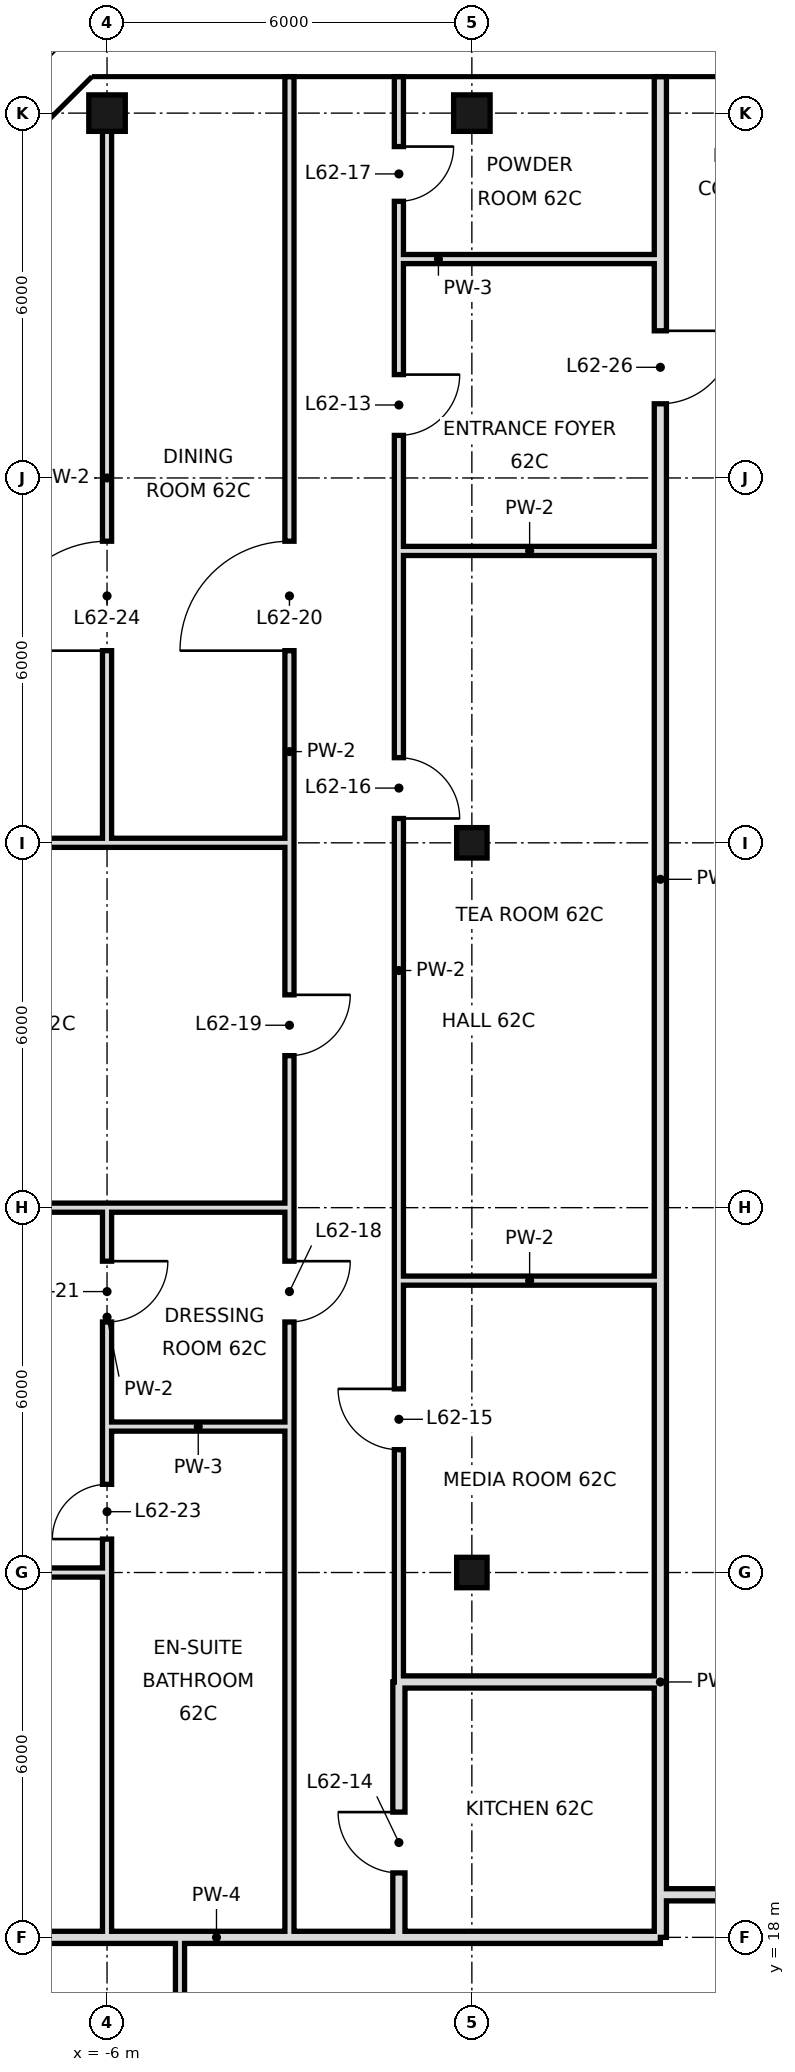
"""IFC4 building model, lengths in metres.
Left out: names, types, materials, properties, quantities, classifications, styles, units other than length and angle.
Written with IfcOpenShell. Run it as: python <this file> out.ifc"""

import sys

from ifc_helpers import new_model, si_unit, direction, frame, frame_2d, origin, origin_2d, place, context, subcontext, project, spatial, rectangle, hollow_rectangle, extrude, element, fill, save


model = new_model("IFC4")
c1 = context("Model", 3, precision=1e-05, world=origin(), true_north=direction((0.0, 1.0)))
c2 = subcontext(c1, "Body", "Model", "MODEL_VIEW")
j1 = project(units=[si_unit("LENGTHUNIT", "METRE"), si_unit("PLANEANGLEUNIT", "RADIAN")], contexts=[c1])
p1 = place(None, origin())
s1 = spatial("IfcSite", under=j1, at=p1, CompositionType="ELEMENT")
p2 = place(p1, origin())
s2 = spatial("IfcBuilding", under=s1, at=p2, CompositionType="ELEMENT")
p3 = place(p2, frame((0.0, 0.0, 263.0)))
s3 = spatial("IfcBuildingStorey", under=s2, at=p3, CompositionType="ELEMENT", Elevation=263.0)
p4 = place(p3, frame((-6.0, 48.0, 0.0), z_axis=(0.0, 0.0, 1.0), x_axis=(1.0, 0.0, 0.0)))
e1 = element("IfcColumn", 1, at=p4, inside=s3, PredefinedType="COLUMN", context=c2, shape_type="SweptSolid", body=[
    extrude(hollow_rectangle(XDim=0.6, YDim=0.6, WallThickness=0.028, at=origin_2d()), origin(), (0.0, 0.0, 1.0), 3.6),
])
for number, where, z_axis, x_axis in (
    (2, (0.0, 24.0, 0.0), (0.0, 0.0, 1.0), (1.0, 0.0, 0.0)),
    (3, (0.0, 36.0, 0.0), (0.0, 0.0, 1.0), (1.0, 0.0, 0.0)),
):
    element("IfcColumn", number, at=place(p3, frame(where, z_axis=z_axis, x_axis=x_axis)), inside=s3, PredefinedType="COLUMN", context=c2, shape_type="SweptSolid", body=[
        extrude(hollow_rectangle(XDim=0.5, YDim=0.5, WallThickness=0.025, at=origin_2d()), origin(), (0.0, 0.0, 1.0), 3.6),
    ])
p5 = place(p3, frame((0.0, 48.0, 0.0), z_axis=(0.0, 0.0, 1.0), x_axis=(1.0, 0.0, 0.0)))
e4 = element("IfcColumn", 4, at=p5, inside=s3, PredefinedType="COLUMN", context=c2, shape_type="SweptSolid", body=[
    extrude(hollow_rectangle(XDim=0.6, YDim=0.6, WallThickness=0.028, at=origin_2d()), origin(), (0.0, 0.0, 1.0), 3.6),
])
p6 = place(p3, frame((-1.2, 18.0, 0.0), z_axis=(0.0, 0.0, 1.0), x_axis=(0.0, 1.0, 0.0)))
e5 = element("IfcWall", 5, at=p6, inside=s3, PredefinedType="SOLIDWALL", context=c2, shape_type="SweptSolid", body=[
    extrude(rectangle(XDim=4.2, YDim=0.2, at=frame_2d((2.1, 0.0))), origin(), (0.0, 0.0, 1.0), 2.72),
])
p7 = place(p6, frame((1.06, 0.0, 0.0)))
e6 = element("IfcOpeningElement", 6, at=p7, cuts=e5, PredefinedType="OPENING", context=c2, shape_type="SweptSolid", body=[
    extrude(rectangle(XDim=1.0, YDim=2.4, at=frame_2d((0.5, 1.2))), frame((0.0, 0.11, 0.0), z_axis=(0.0, -1.0, 0.0), x_axis=(1.0, 0.0, 0.0)), (0.0, 0.0, 1.0), 0.22),
])
p8 = place(p3, frame((-1.2, 22.2, 0.0), z_axis=(0.0, 0.0, 1.0), x_axis=(0.0, 1.0, 0.0)))
e7 = element("IfcWall", 7, at=p8, inside=s3, PredefinedType="PARTITIONING", context=c2, shape_type="SweptSolid", body=[
    extrude(rectangle(XDim=23.4, YDim=0.15, at=frame_2d((11.7, 0.0))), origin(), (0.0, 0.0, 1.0), 3.42),
])
p9 = place(p8, frame((20.5, 0.0, 0.0)))
e8 = element("IfcOpeningElement", 8, at=p9, cuts=e7, PredefinedType="OPENING", context=c2, shape_type="SweptSolid", body=[
    extrude(rectangle(XDim=1.0, YDim=2.4, at=frame_2d((0.5, 1.2))), frame((0.0, 0.085, 0.0), z_axis=(0.0, -1.0, 0.0), x_axis=(1.0, 0.0, 0.0)), (0.0, 0.0, 1.0), 0.17),
])
p10 = place(p8, frame((3.82, 0.0, 0.0)))
e9 = element("IfcOpeningElement", 9, at=p10, cuts=e7, PredefinedType="OPENING", context=c2, shape_type="SweptSolid", body=[
    extrude(rectangle(XDim=1.0, YDim=2.4, at=frame_2d((0.5, 1.2))), frame((0.0, 0.085, 0.0), z_axis=(0.0, -1.0, 0.0), x_axis=(1.0, 0.0, 0.0)), (0.0, 0.0, 1.0), 0.17),
])
p11 = place(p8, frame((14.2, 0.0, 0.0)))
e10 = element("IfcOpeningElement", 10, at=p11, cuts=e7, PredefinedType="OPENING", context=c2, shape_type="SweptSolid", body=[
    extrude(rectangle(XDim=1.0, YDim=2.4, at=frame_2d((0.5, 1.2))), frame((0.0, 0.085, 0.0), z_axis=(0.0, -1.0, 0.0), x_axis=(1.0, 0.0, 0.0)), (0.0, 0.0, 1.0), 0.17),
])
p12 = place(p3, frame((-1.2, 45.6, 0.0), z_axis=(0.0, 0.0, 1.0), x_axis=(0.0, 1.0, 0.0)))
e11 = element("IfcWall", 11, at=p12, inside=s3, PredefinedType="PARTITIONING", context=c2, shape_type="SweptSolid", body=[
    extrude(rectangle(XDim=3.0, YDim=0.15, at=frame_2d((1.5, 0.0))), origin(), (0.0, 0.0, 1.0), 3.42),
])
p13 = place(p12, frame((0.95, 0.0, 0.0)))
e12 = element("IfcOpeningElement", 12, at=p13, cuts=e11, PredefinedType="OPENING", context=c2, shape_type="SweptSolid", body=[
    extrude(rectangle(XDim=0.9, YDim=2.4, at=frame_2d((0.45, 1.2))), frame((0.0, 0.085, 0.0), z_axis=(0.0, -1.0, 0.0), x_axis=(1.0, 0.0, 0.0)), (0.0, 0.0, 1.0), 0.17),
])
p14 = place(p3, frame((-3.0, 26.4, 0.0), z_axis=(0.0, 0.0, 1.0), x_axis=(0.0, 1.0, 0.0)))
e13 = element("IfcWall", 13, at=p14, inside=s3, PredefinedType="PARTITIONING", context=c2, shape_type="SweptSolid", body=[
    extrude(rectangle(XDim=22.2, YDim=0.15, at=frame_2d((11.1, 0.0))), origin(), (0.0, 0.0, 1.0), 3.42),
])
p15 = place(p14, frame((1.72, 0.0, 0.0)))
e14 = element("IfcOpeningElement", 14, at=p15, cuts=e13, PredefinedType="OPENING", context=c2, shape_type="SweptSolid", body=[
    extrude(rectangle(XDim=1.0, YDim=2.4, at=frame_2d((0.5, 1.2))), frame((0.0, 0.085, 0.0), z_axis=(0.0, -1.0, 0.0), x_axis=(1.0, 0.0, 0.0)), (0.0, 0.0, 1.0), 0.17),
])
p16 = place(p14, frame((6.1, 0.0, 0.0)))
e15 = element("IfcOpeningElement", 15, at=p16, cuts=e13, PredefinedType="OPENING", context=c2, shape_type="SweptSolid", body=[
    extrude(rectangle(XDim=1.0, YDim=2.4, at=frame_2d((0.5, 1.2))), frame((0.0, 0.085, 0.0), z_axis=(0.0, -1.0, 0.0), x_axis=(1.0, 0.0, 0.0)), (0.0, 0.0, 1.0), 0.17),
])
p17 = place(p14, frame((12.76, 0.0, 0.0)))
e16 = element("IfcOpeningElement", 16, at=p17, cuts=e13, PredefinedType="OPENING", context=c2, shape_type="SweptSolid", body=[
    extrude(rectangle(XDim=1.8, YDim=2.4, at=frame_2d((0.9, 1.2))), frame((0.0, 0.085, 0.0), z_axis=(0.0, -1.0, 0.0), x_axis=(1.0, 0.0, 0.0)), (0.0, 0.0, 1.0), 0.17),
])
p18 = place(p3, frame((-3.0, 18.0, 0.0), z_axis=(0.0, 0.0, 1.0), x_axis=(0.0, 1.0, 0.0)))
e17 = element("IfcWall", 17, at=p18, inside=s3, PredefinedType="PARTITIONING", context=c2, shape_type="SweptSolid", body=[
    extrude(rectangle(XDim=8.4, YDim=0.15, at=frame_2d((4.2, 0.0))), origin(), (0.0, 0.0, 1.0), 3.42),
])
p19 = place(p3, frame((-4.8, 10.8, 0.0), z_axis=(0.0, 0.0, 1.0), x_axis=(0.0, 1.0, 0.0)))
e18 = element("IfcWall", 18, at=p19, inside=s3, PredefinedType="PARTITIONING", context=c2, shape_type="SweptSolid", body=[
    extrude(rectangle(XDim=7.2, YDim=0.15, at=frame_2d((3.6, 0.0))), origin(), (0.0, 0.0, 1.0), 3.42),
])
p20 = place(p3, frame((-6.0, 26.4, 0.0), z_axis=(0.0, 0.0, 1.0), x_axis=(0.0, 1.0, 0.0)))
e19 = element("IfcWall", 19, at=p20, inside=s3, PredefinedType="PARTITIONING", context=c2, shape_type="SweptSolid", body=[
    extrude(rectangle(XDim=3.6, YDim=0.15, at=frame_2d((1.8, 0.0))), origin(), (0.0, 0.0, 1.0), 3.42),
])
p21 = place(p20, frame((1.72, 0.0, 0.0)))
e20 = element("IfcOpeningElement", 20, at=p21, cuts=e19, PredefinedType="OPENING", context=c2, shape_type="SweptSolid", body=[
    extrude(rectangle(XDim=1.0, YDim=2.4, at=frame_2d((0.5, 1.2))), frame((0.0, 0.085, 0.0), z_axis=(0.0, -1.0, 0.0), x_axis=(1.0, 0.0, 0.0)), (0.0, 0.0, 1.0), 0.17),
])
p22 = place(p3, frame((-6.0, 36.0, 0.0), z_axis=(0.0, 0.0, 1.0), x_axis=(0.0, 1.0, 0.0)))
e21 = element("IfcWall", 21, at=p22, inside=s3, PredefinedType="PARTITIONING", context=c2, shape_type="SweptSolid", body=[
    extrude(rectangle(XDim=12.0, YDim=0.15, at=frame_2d((6.0, 0.0))), origin(), (0.0, 0.0, 1.0), 3.42),
])
p23 = place(p22, frame((3.16, 0.0, 0.0)))
e22 = element("IfcOpeningElement", 22, at=p23, cuts=e21, PredefinedType="OPENING", context=c2, shape_type="SweptSolid", body=[
    extrude(rectangle(XDim=1.8, YDim=2.4, at=frame_2d((0.9, 1.2))), frame((0.0, 0.085, 0.0), z_axis=(0.0, -1.0, 0.0), x_axis=(1.0, 0.0, 0.0)), (0.0, 0.0, 1.0), 0.17),
])
p24 = place(p3, frame((-6.0, 18.0, 0.0), z_axis=(0.0, 0.0, 1.0), x_axis=(0.0, 1.0, 0.0)))
e23 = element("IfcWall", 23, at=p24, inside=s3, PredefinedType="PARTITIONING", context=c2, shape_type="SweptSolid", body=[
    extrude(rectangle(XDim=8.4, YDim=0.15, at=frame_2d((4.2, 0.0))), origin(), (0.0, 0.0, 1.0), 3.42),
])
p25 = place(p24, frame((6.55, 0.0, 0.0)))
e24 = element("IfcOpeningElement", 24, at=p25, cuts=e23, PredefinedType="OPENING", context=c2, shape_type="SweptSolid", body=[
    extrude(rectangle(XDim=0.9, YDim=2.4, at=frame_2d((0.45, 1.2))), frame((0.0, 0.085, 0.0), z_axis=(0.0, -1.0, 0.0), x_axis=(1.0, 0.0, 0.0)), (0.0, 0.0, 1.0), 0.17),
])
p26 = place(p3, frame((3.1, 22.2, 0.0), z_axis=(0.0, 0.0, 1.0), x_axis=(0.0, 1.0, 0.0)))
e25 = element("IfcWall", 25, at=p26, inside=s3, PredefinedType="SOLIDWALL", context=c2, shape_type="SweptSolid", body=[
    extrude(rectangle(XDim=26.4, YDim=0.2, at=frame_2d((13.2, 0.0))), origin(), (0.0, 0.0, 1.0), 2.72),
])
p27 = place(p26, frame((21.02, 0.0, 0.0)))
e26 = element("IfcOpeningElement", 26, at=p27, cuts=e25, PredefinedType="OPENING", context=c2, shape_type="SweptSolid", body=[
    extrude(rectangle(XDim=1.2, YDim=2.4, at=frame_2d((0.6, 1.2))), frame((0.0, 0.11, 0.0), z_axis=(0.0, -1.0, 0.0), x_axis=(1.0, 0.0, 0.0)), (0.0, 0.0, 1.0), 0.22),
])
p28 = place(p3, frame((3.1, 18.0, 0.0), z_axis=(0.0, 0.0, 1.0), x_axis=(0.0, 1.0, 0.0)))
e27 = element("IfcWall", 27, at=p28, inside=s3, PredefinedType="SOLIDWALL", context=c2, shape_type="SweptSolid", body=[
    extrude(rectangle(XDim=4.2, YDim=0.2, at=frame_2d((2.1, 0.0))), origin(), (0.0, 0.0, 1.0), 2.97),
])
p29 = place(p3, frame((-1.2, 18.0, 0.0), z_axis=(0.0, 0.0, 1.0), x_axis=(1.0, 0.0, 0.0)))
e28 = element("IfcWall", 28, at=p29, inside=s3, PredefinedType="SOLIDWALL", context=c2, shape_type="SweptSolid", body=[
    extrude(rectangle(XDim=4.3, YDim=0.2, at=frame_2d((2.15, 0.0))), origin(), (0.0, 0.0, 1.0), 2.72),
])
p30 = place(p3, frame((-7.2, 18.0, 0.0), z_axis=(0.0, 0.0, 1.0), x_axis=(1.0, 0.0, 0.0)))
e29 = element("IfcWall", 29, at=p30, inside=s3, PredefinedType="SOLIDWALL", context=c2, shape_type="SweptSolid", body=[
    extrude(rectangle(XDim=6.0, YDim=0.2, at=frame_2d((3.0, 0.0))), origin(), (0.0, 0.0, 1.0), 2.72),
])
p31 = place(p3, frame((3.1, 18.7, 0.0), z_axis=(0.0, 0.0, 1.0), x_axis=(1.0, 0.0, 0.0)))
e30 = element("IfcWall", 30, at=p31, inside=s3, PredefinedType="SOLIDWALL", context=c2, shape_type="SweptSolid", body=[
    extrude(rectangle(XDim=41.8, YDim=0.2, at=frame_2d((20.9, 0.0))), origin(), (0.0, 0.0, 1.0), 2.72),
])
p32 = place(p31, frame((5.64, 0.0, 0.0)))
e31 = element("IfcOpeningElement", 31, at=p32, cuts=e30, PredefinedType="OPENING", context=c2, shape_type="SweptSolid", body=[
    extrude(rectangle(XDim=1.2, YDim=2.4, at=frame_2d((0.6, 1.2))), frame((0.0, 0.11, 0.0), z_axis=(0.0, -1.0, 0.0), x_axis=(1.0, 0.0, 0.0)), (0.0, 0.0, 1.0), 0.22),
])
p33 = place(p31, frame((22.53, 0.0, 0.0)))
e32 = element("IfcOpeningElement", 32, at=p33, cuts=e30, PredefinedType="OPENING", context=c2, shape_type="SweptSolid", body=[
    extrude(rectangle(XDim=1.8, YDim=2.4, at=frame_2d((0.9, 1.2))), frame((0.0, 0.11, 0.0), z_axis=(0.0, -1.0, 0.0), x_axis=(1.0, 0.0, 0.0)), (0.0, 0.0, 1.0), 0.22),
])
p34 = place(p3, frame((-1.2, 22.2, 0.0), z_axis=(0.0, 0.0, 1.0), x_axis=(1.0, 0.0, 0.0)))
e33 = element("IfcWall", 33, at=p34, inside=s3, PredefinedType="SOLIDWALL", context=c2, shape_type="SweptSolid", body=[
    extrude(rectangle(XDim=4.3, YDim=0.2, at=frame_2d((2.15, 0.0))), origin(), (0.0, 0.0, 1.0), 2.72),
])
p35 = place(p3, frame((-12.0, 24.0, 0.0), z_axis=(0.0, 0.0, 1.0), x_axis=(1.0, 0.0, 0.0)))
e34 = element("IfcWall", 34, at=p35, inside=s3, PredefinedType="PARTITIONING", context=c2, shape_type="SweptSolid", body=[
    extrude(rectangle(XDim=6.0, YDim=0.15, at=frame_2d((3.0, 0.0))), origin(), (0.0, 0.0, 1.0), 2.72),
])
p36 = place(p35, frame((2.5, 0.0, 0.0)))
e35 = element("IfcOpeningElement", 35, at=p36, cuts=e34, PredefinedType="OPENING", context=c2, shape_type="SweptSolid", body=[
    extrude(rectangle(XDim=1.0, YDim=2.4, at=frame_2d((0.5, 1.2))), frame((0.0, 0.085, 0.0), z_axis=(0.0, -1.0, 0.0), x_axis=(1.0, 0.0, 0.0)), (0.0, 0.0, 1.0), 0.17),
])
p37 = place(p3, frame((-6.0, 26.4, 0.0), z_axis=(0.0, 0.0, 1.0), x_axis=(1.0, 0.0, 0.0)))
e36 = element("IfcWall", 36, at=p37, inside=s3, PredefinedType="PARTITIONING", context=c2, shape_type="SweptSolid", body=[
    extrude(rectangle(XDim=3.0, YDim=0.15, at=frame_2d((1.5, 0.0))), origin(), (0.0, 0.0, 1.0), 3.42),
])
p38 = place(p3, frame((-1.2, 28.8, 0.0), z_axis=(0.0, 0.0, 1.0), x_axis=(1.0, 0.0, 0.0)))
e37 = element("IfcWall", 37, at=p38, inside=s3, PredefinedType="PARTITIONING", context=c2, shape_type="SweptSolid", body=[
    extrude(rectangle(XDim=4.3, YDim=0.15, at=frame_2d((2.15, 0.0))), origin(), (0.0, 0.0, 1.0), 3.42),
])
p39 = place(p3, frame((-12.6, 30.0, 0.0), z_axis=(0.0, 0.0, 1.0), x_axis=(1.0, 0.0, 0.0)))
e38 = element("IfcWall", 38, at=p39, inside=s3, PredefinedType="PARTITIONING", context=c2, shape_type="SweptSolid", body=[
    extrude(rectangle(XDim=9.6, YDim=0.15, at=frame_2d((4.8, 0.0))), origin(), (0.0, 0.0, 1.0), 2.72),
])
p40 = place(p3, frame((-12.0, 36.0, 0.0), z_axis=(0.0, 0.0, 1.0), x_axis=(1.0, 0.0, 0.0)))
e39 = element("IfcWall", 39, at=p40, inside=s3, PredefinedType="PARTITIONING", context=c2, shape_type="SweptSolid", body=[
    extrude(rectangle(XDim=9.0, YDim=0.15, at=frame_2d((4.5, 0.0))), origin(), (0.0, 0.0, 1.0), 2.72),
])
for number, where, z_axis, x_axis in (
    (40, (-1.2, 40.8, 0.0), (0.0, 0.0, 1.0), (1.0, 0.0, 0.0)),
    (41, (-1.2, 45.6, 0.0), (0.0, 0.0, 1.0), (1.0, 0.0, 0.0)),
):
    element("IfcWall", number, at=place(p3, frame(where, z_axis=z_axis, x_axis=x_axis)), inside=s3, PredefinedType="PARTITIONING", context=c2, shape_type="SweptSolid", body=[
        extrude(rectangle(XDim=4.3, YDim=0.15, at=frame_2d((2.15, 0.0))), origin(), (0.0, 0.0, 1.0), 3.42),
    ])
p41 = place(p9, origin())
e42 = element("IfcDoor", 42, at=p41, inside=s3, OperationType="SINGLE_SWING_RIGHT", PredefinedType="DOOR", context=c2, shape_type="SweptSolid", body=[
    extrude(rectangle(XDim=1.0, YDim=2.4, at=frame_2d((0.5, 1.2))), frame((0.0, 0.025, 0.0), z_axis=(0.0, -1.0, 0.0), x_axis=(1.0, 0.0, 0.0)), (0.0, 0.0, 1.0), 0.05),
])
fill(e8, e42)
p42 = place(p7, frame((1.0, 0.0, 0.0), z_axis=(0.0, 0.0, 1.0), x_axis=(-1.0, 0.0, 0.0)))
e43 = element("IfcDoor", 43, at=p42, inside=s3, OperationType="SINGLE_SWING_LEFT", PredefinedType="DOOR", context=c2, shape_type="SweptSolid", body=[
    extrude(rectangle(XDim=1.0, YDim=2.4, at=frame_2d((0.5, 1.2))), frame((0.0, 0.025, 0.0), z_axis=(0.0, -1.0, 0.0), x_axis=(1.0, 0.0, 0.0)), (0.0, 0.0, 1.0), 0.05),
])
fill(e6, e43)
p43 = place(p10, frame((1.0, 0.0, 0.0), z_axis=(0.0, 0.0, 1.0), x_axis=(-1.0, 0.0, 0.0)))
e44 = element("IfcDoor", 44, at=p43, inside=s3, OperationType="SINGLE_SWING_LEFT", PredefinedType="DOOR", context=c2, shape_type="SweptSolid", body=[
    extrude(rectangle(XDim=1.0, YDim=2.4, at=frame_2d((0.5, 1.2))), frame((0.0, 0.025, 0.0), z_axis=(0.0, -1.0, 0.0), x_axis=(1.0, 0.0, 0.0)), (0.0, 0.0, 1.0), 0.05),
])
fill(e9, e44)
p44 = place(p11, frame((1.0, 0.0, 0.0), z_axis=(0.0, 0.0, 1.0), x_axis=(-1.0, 0.0, 0.0)))
e45 = element("IfcDoor", 45, at=p44, inside=s3, OperationType="SINGLE_SWING_RIGHT", PredefinedType="DOOR", context=c2, shape_type="SweptSolid", body=[
    extrude(rectangle(XDim=1.0, YDim=2.4, at=frame_2d((0.5, 1.2))), frame((0.0, 0.025, 0.0), z_axis=(0.0, -1.0, 0.0), x_axis=(1.0, 0.0, 0.0)), (0.0, 0.0, 1.0), 0.05),
])
fill(e10, e45)
p45 = place(p13, origin())
e46 = element("IfcDoor", 46, at=p45, inside=s3, OperationType="SINGLE_SWING_RIGHT", PredefinedType="DOOR", context=c2, shape_type="SweptSolid", body=[
    extrude(rectangle(XDim=0.9, YDim=2.4, at=frame_2d((0.45, 1.2))), frame((0.0, 0.025, 0.0), z_axis=(0.0, -1.0, 0.0), x_axis=(1.0, 0.0, 0.0)), (0.0, 0.0, 1.0), 0.05),
])
fill(e12, e46)
p46 = place(p15, origin())
e47 = element("IfcDoor", 47, at=p46, inside=s3, OperationType="SINGLE_SWING_RIGHT", PredefinedType="DOOR", context=c2, shape_type="SweptSolid", body=[
    extrude(rectangle(XDim=1.0, YDim=2.4, at=frame_2d((0.5, 1.2))), frame((0.0, 0.025, 0.0), z_axis=(0.0, -1.0, 0.0), x_axis=(1.0, 0.0, 0.0)), (0.0, 0.0, 1.0), 0.05),
])
fill(e14, e47)
p47 = place(p16, origin())
e48 = element("IfcDoor", 48, at=p47, inside=s3, OperationType="SINGLE_SWING_RIGHT", PredefinedType="DOOR", context=c2, shape_type="SweptSolid", body=[
    extrude(rectangle(XDim=1.0, YDim=2.4, at=frame_2d((0.5, 1.2))), frame((0.0, 0.025, 0.0), z_axis=(0.0, -1.0, 0.0), x_axis=(1.0, 0.0, 0.0)), (0.0, 0.0, 1.0), 0.05),
])
fill(e15, e48)
p48 = place(p17, origin())
e49 = element("IfcDoor", 49, at=p48, inside=s3, OperationType="SINGLE_SWING_LEFT", PredefinedType="DOOR", context=c2, shape_type="SweptSolid", body=[
    extrude(rectangle(XDim=1.8, YDim=2.4, at=frame_2d((0.9, 1.2))), frame((0.0, 0.025, 0.0), z_axis=(0.0, -1.0, 0.0), x_axis=(1.0, 0.0, 0.0)), (0.0, 0.0, 1.0), 0.05),
])
fill(e16, e49)
p49 = place(p21, origin())
e50 = element("IfcDoor", 50, at=p49, inside=s3, OperationType="SINGLE_SWING_RIGHT", PredefinedType="DOOR", context=c2, shape_type="SweptSolid", body=[
    extrude(rectangle(XDim=1.0, YDim=2.4, at=frame_2d((0.5, 1.2))), frame((0.0, 0.025, 0.0), z_axis=(0.0, -1.0, 0.0), x_axis=(1.0, 0.0, 0.0)), (0.0, 0.0, 1.0), 0.05),
])
fill(e20, e50)
p50 = place(p25, origin())
e51 = element("IfcDoor", 51, at=p50, inside=s3, OperationType="SINGLE_SWING_LEFT", PredefinedType="DOOR", context=c2, shape_type="SweptSolid", body=[
    extrude(rectangle(XDim=0.9, YDim=2.4, at=frame_2d((0.45, 1.2))), frame((0.0, 0.025, 0.0), z_axis=(0.0, -1.0, 0.0), x_axis=(1.0, 0.0, 0.0)), (0.0, 0.0, 1.0), 0.05),
])
fill(e24, e51)
p51 = place(p23, origin())
e52 = element("IfcDoor", 52, at=p51, inside=s3, OperationType="SINGLE_SWING_LEFT", PredefinedType="DOOR", context=c2, shape_type="SweptSolid", body=[
    extrude(rectangle(XDim=1.8, YDim=2.4, at=frame_2d((0.9, 1.2))), frame((0.0, 0.025, 0.0), z_axis=(0.0, -1.0, 0.0), x_axis=(1.0, 0.0, 0.0)), (0.0, 0.0, 1.0), 0.05),
])
fill(e22, e52)
p52 = place(p27, origin())
e53 = element("IfcDoor", 53, at=p52, inside=s3, OperationType="SINGLE_SWING_RIGHT", PredefinedType="DOOR", context=c2, shape_type="SweptSolid", body=[
    extrude(rectangle(XDim=1.2, YDim=2.4, at=frame_2d((0.6, 1.2))), frame((0.0, 0.025, 0.0), z_axis=(0.0, -1.0, 0.0), x_axis=(1.0, 0.0, 0.0)), (0.0, 0.0, 1.0), 0.05),
])
fill(e26, e53)
save(model, sys.argv[1])
